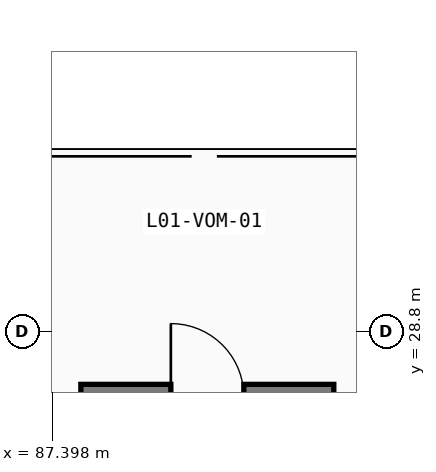
"""IFC4 building model, lengths in metres.
Left out: names, types, materials, properties, quantities, classifications, styles, units other than length and angle.
Written with IfcOpenShell. Run it as: python <this file> out.ifc"""

import sys

from ifc_helpers import new_model, si_unit, direction, frame, frame_2d, origin, place, context, subcontext, project, spatial, rectangle, extrude, element, save


model = new_model("IFC4")
c1 = context("Model", 3, precision=1e-05, world=origin(), true_north=direction((0.0, 1.0)))
c2 = subcontext(c1, "Body", "Model", "MODEL_VIEW")
j1 = project(units=[si_unit("LENGTHUNIT", "METRE"), si_unit("PLANEANGLEUNIT", "RADIAN")], contexts=[c1])
p1 = place(None, origin())
s1 = spatial("IfcSite", under=j1, at=p1, CompositionType="ELEMENT")
p2 = place(p1, origin())
s2 = spatial("IfcBuilding", under=s1, at=p2, CompositionType="ELEMENT")
p3 = place(p2, frame((0.0, 0.0, 4.8)))
s3 = spatial("IfcBuildingStorey", under=s2, at=p3, CompositionType="ELEMENT", Elevation=4.8)
p4 = place(p3, frame((92.03, 27.73, 0.0), z_axis=(0.0, 0.0, 1.0), x_axis=(-1.0, 0.0, 0.0)))
e1 = element("IfcWall", 1, at=p4, inside=s3, PredefinedType="SHEAR", context=c2, shape_type="SweptSolid", body=[
    extrude(rectangle(XDim=4.16, YDim=0.4, at=frame_2d((2.08, 0.0))), origin(), (0.0, 0.0, 1.0), 4.52),
])
p5 = place(p4, frame((2.68, 0.0, 0.0), z_axis=(0.0, 0.0, 1.0), x_axis=(-1.0, 0.0, 0.0)))
e2 = element("IfcOpeningElement", 2, at=p5, cuts=e1, PredefinedType="OPENING", context=c2, shape_type="SweptSolid", body=[
    extrude(rectangle(XDim=1.2, YDim=2.2, at=frame_2d((0.6, 1.1))), frame((0.0, 0.21, 0.0), z_axis=(0.0, -1.0, 0.0), x_axis=(1.0, 0.0, 0.0)), (0.0, 0.0, 1.0), 0.42),
])
save(model, sys.argv[1])
